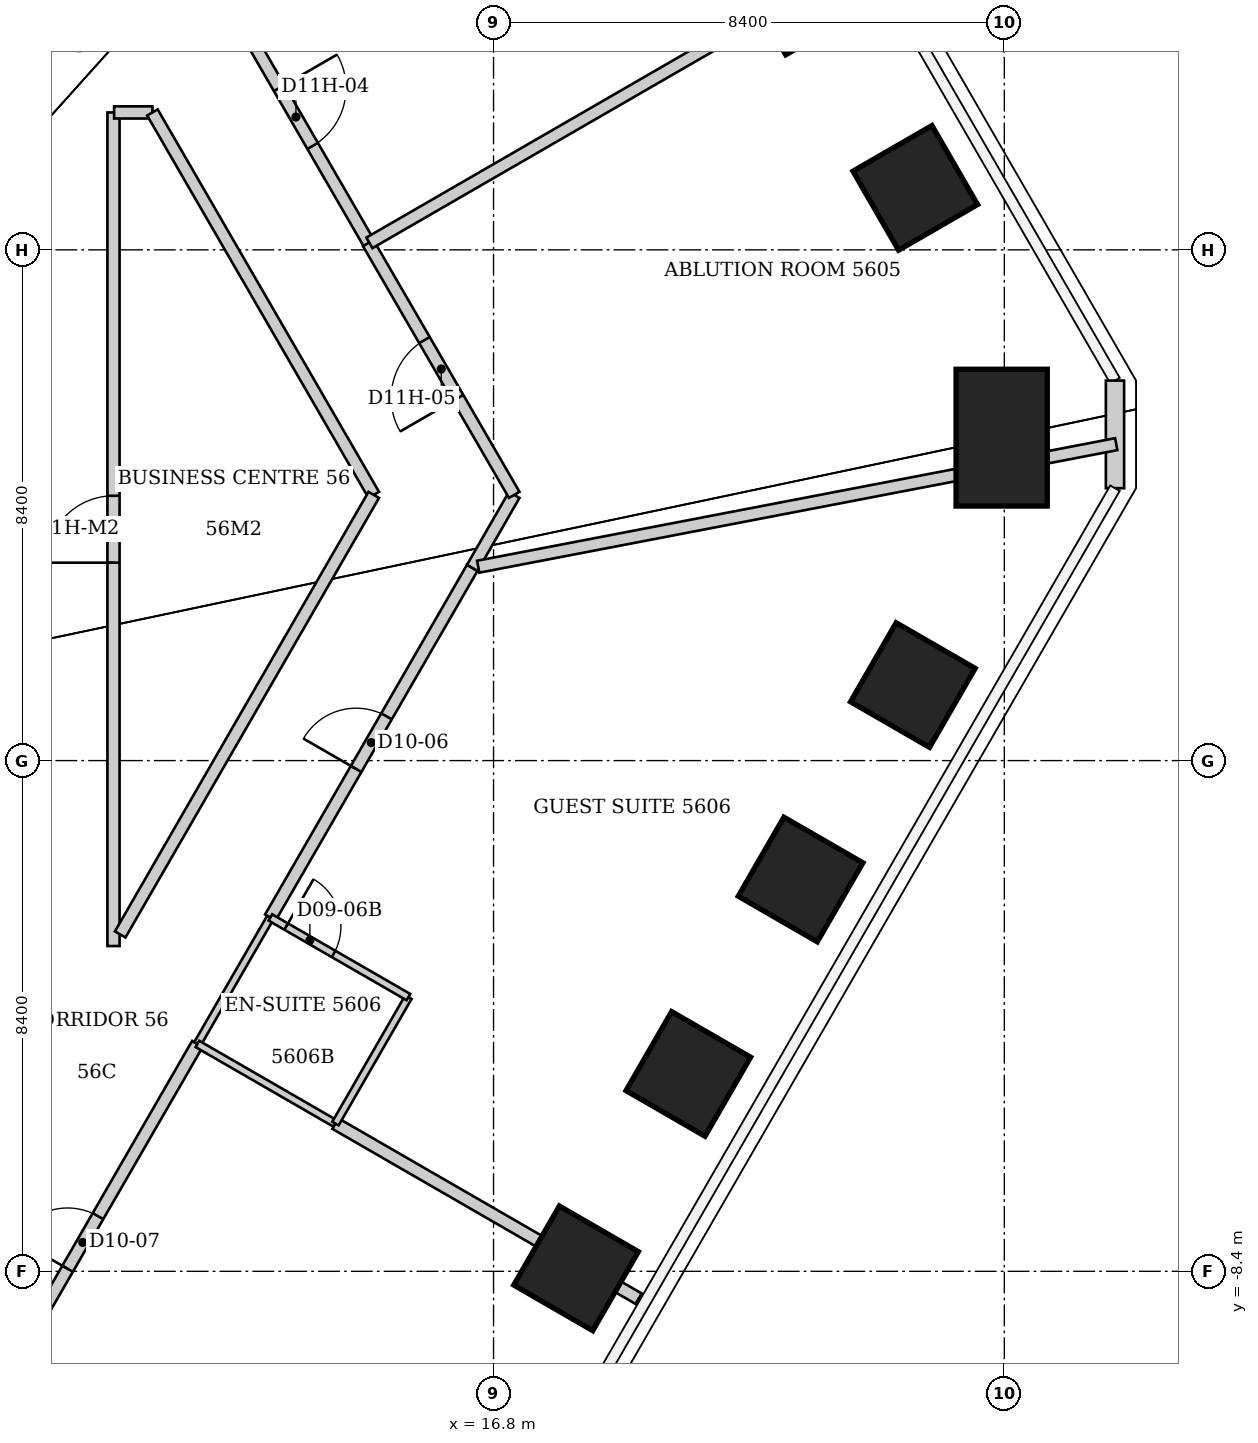
"""IFC4 building model, lengths in metres.
Left out: names, types, materials, properties, quantities, classifications, styles, units other than length and angle.
Written with IfcOpenShell. Run it as: python <this file> out.ifc"""

import sys

from ifc_helpers import new_model, si_unit, direction, frame, frame_2d, origin, origin_2d, place, context, subcontext, project, spatial, rectangle, extrude, element, fill, save


model = new_model("IFC4")
c1 = context("Model", 3, precision=1e-05, world=origin(), true_north=direction((0.0, 1.0)))
c2 = subcontext(c1, "Body", "Model", "MODEL_VIEW")
j1 = project(units=[si_unit("LENGTHUNIT", "METRE"), si_unit("PLANEANGLEUNIT", "RADIAN")], contexts=[c1])
p1 = place(None, origin())
s1 = spatial("IfcSite", under=j1, at=p1, CompositionType="ELEMENT")
p2 = place(p1, origin())
s2 = spatial("IfcBuilding", under=s1, at=p2, CompositionType="ELEMENT")
p3 = place(p2, frame((0.0, 0.0, 225.0)))
s3 = spatial("IfcBuildingStorey", under=s2, at=p3, CompositionType="ELEMENT", Elevation=225.0)
for number, where, z_axis, x_axis in (
    (1, (21.88, 12.633, 0.0), (0.0, 0.0, 1.0), (0.866, 0.5, 0.0)),
    (2, (23.735, 9.419, 0.0), (0.0, 0.0, 1.0), (0.866, 0.5, 0.0)),
):
    element("IfcColumn", number, at=place(p3, frame(where, z_axis=z_axis, x_axis=x_axis)), inside=s3, PredefinedType="COLUMN", context=c2, shape_type="SweptSolid", body=[
        extrude(rectangle(XDim=1.5, YDim=1.5, at=origin_2d()), origin(), (0.0, 0.0, 1.0), 3.8),
    ])
p4 = place(p3, frame((25.156, 5.311, 0.0), z_axis=(0.0, 0.0, 1.0), x_axis=(1.0, 0.0, 0.0)))
e3 = element("IfcColumn", 3, at=p4, inside=s3, PredefinedType="COLUMN", context=c2, shape_type="SweptSolid", body=[
    extrude(rectangle(XDim=1.5, YDim=2.25, at=origin_2d()), origin(), (0.0, 0.0, 1.0), 3.8),
])
for number, where, z_axis, x_axis in (
    (4, (23.696, 1.242, 0.0), (0.0, 0.0, 1.0), (0.866, -0.5, 0.0)),
    (5, (21.85, -1.956, 0.0), (0.0, 0.0, 1.0), (0.866, -0.5, 0.0)),
    (6, (20.003, -5.153, 0.0), (0.0, 0.0, 1.0), (0.866, -0.5, 0.0)),
    (7, (18.157, -8.351, 0.0), (0.0, 0.0, 1.0), (0.866, -0.5, 0.0)),
):
    element("IfcColumn", number, at=place(p3, frame(where, z_axis=z_axis, x_axis=x_axis)), inside=s3, PredefinedType="COLUMN", context=c2, shape_type="SweptSolid", body=[
        extrude(rectangle(XDim=1.5, YDim=1.5, at=origin_2d()), origin(), (0.0, 0.0, 1.0), 3.8),
    ])
p5 = place(p3, frame((27.02, 6.25, 0.0), z_axis=(0.0, 0.0, 1.0), x_axis=(0.0, -1.0, 0.0)))
e8 = element("IfcWall", 8, at=p5, inside=s3, PredefinedType="SOLIDWALL", context=c2, shape_type="SweptSolid", body=[
    extrude(rectangle(XDim=1.77, YDim=0.3, at=frame_2d((0.885, 0.0))), origin(), (0.0, 0.0, 1.0), 3.64),
])
p6 = place(p3, frame((8.16, -11.19, 0.0), z_axis=(0.0, 0.0, 1.0), x_axis=(0.500004606796, 0.866022744033, 0.0)))
e9 = element("IfcWall", 9, at=p6, inside=s3, PredefinedType="PARTITIONING", context=c2, shape_type="SweptSolid", body=[
    extrude(rectangle(XDim=7.54, YDim=0.2, at=frame_2d((3.77, 0.0))), origin(), (0.0, 0.0, 1.0), 3.64),
])
p7 = place(p6, frame((3.27, 0.0, 0.0)))
e10 = element("IfcOpeningElement", 10, at=p7, cuts=e9, PredefinedType="OPENING", context=c2, shape_type="SweptSolid", body=[
    extrude(rectangle(XDim=1.0, YDim=2.13, at=frame_2d((0.5, 1.065))), frame((0.0, 0.1, 0.0), z_axis=(0.0, -1.0, 0.0), x_axis=(1.0, 0.0, 0.0)), (0.0, 0.0, 1.0), 0.2),
])
p8 = place(p3, frame((10.55, -3.05, 0.0), z_axis=(0.0, 0.0, 1.0), x_axis=(0.0, 1.0, 0.0)))
e11 = element("IfcWall", 11, at=p8, inside=s3, PredefinedType="PARTITIONING", context=c2, shape_type="SweptSolid", body=[
    extrude(rectangle(XDim=13.71, YDim=0.2, at=frame_2d((6.855, 0.0))), origin(), (0.0, 0.0, 1.0), 3.64),
])
p9 = place(p8, frame((6.305, 0.0, 0.0)))
e12 = element("IfcOpeningElement", 12, at=p9, cuts=e11, PredefinedType="OPENING", context=c2, shape_type="SweptSolid", body=[
    extrude(rectangle(XDim=1.1, YDim=2.2, at=frame_2d((0.55, 1.1))), frame((0.0, 0.1, 0.0), z_axis=(0.0, -1.0, 0.0), x_axis=(1.0, 0.0, 0.0)), (0.0, 0.0, 1.0), 0.2),
])
p10 = place(p3, frame((10.56, 10.66, 0.0), z_axis=(0.0, 0.0, 1.0), x_axis=(1.0, 0.0, 0.0)))
e13 = element("IfcWall", 13, at=p10, inside=s3, PredefinedType="PARTITIONING", context=c2, shape_type="SweptSolid", body=[
    extrude(rectangle(XDim=0.63, YDim=0.2, at=frame_2d((0.315, 0.0))), origin(), (0.0, 0.0, 1.0), 3.64),
])
p11 = place(p3, frame((11.19, 10.66, 0.0), z_axis=(0.0, 0.0, 1.0), x_axis=(0.500899863475, -0.865505243642, 0.0)))
e14 = element("IfcWall", 14, at=p11, inside=s3, PredefinedType="PARTITIONING", context=c2, shape_type="SweptSolid", body=[
    extrude(rectangle(XDim=7.267, YDim=0.2, at=frame_2d((3.634, 0.0))), origin(), (0.0, 0.0, 1.0), 3.64),
])
p12 = place(p3, frame((11.93, -4.66, 0.0), z_axis=(0.0, 0.0, 1.0), x_axis=(0.499737123639, 0.866177122335, 0.0)))
e15 = element("IfcWall", 15, at=p12, inside=s3, PredefinedType="PARTITIONING", context=c2, shape_type="SweptSolid", body=[
    extrude(rectangle(XDim=2.401, YDim=0.12, at=frame_2d((1.201, 0.0))), origin(), (0.0, 0.0, 1.0), 3.64),
])
p13 = place(p3, frame((11.93, -4.66, 0.0), z_axis=(0.0, 0.0, 1.0), x_axis=(0.865969958829, -0.500096021185, 0.0)))
e16 = element("IfcWall", 16, at=p13, inside=s3, PredefinedType="PARTITIONING", context=c2, shape_type="SweptSolid", body=[
    extrude(rectangle(XDim=2.621, YDim=0.12, at=frame_2d((1.311, 0.0))), origin(), (0.0, 0.0, 1.0), 3.038),
])
p14 = place(p3, frame((12.35, 12.66, 0.0), z_axis=(0.0, 0.0, 1.0), x_axis=(0.500618647881, -0.86566793252, 0.0)))
e17 = element("IfcWall", 17, at=p14, inside=s3, PredefinedType="PARTITIONING", context=c2, shape_type="SweptSolid", body=[
    extrude(rectangle(XDim=4.794, YDim=0.2, at=frame_2d((2.397, 0.0))), origin(), (0.0, 0.0, 1.0), 3.64),
])
p15 = place(p14, frame((1.847, 0.0, 0.0)))
e18 = element("IfcOpeningElement", 18, at=p15, cuts=e17, PredefinedType="OPENING", context=c2, shape_type="SweptSolid", body=[
    extrude(rectangle(XDim=1.1, YDim=2.2, at=frame_2d((0.55, 1.1))), frame((0.0, 0.1, 0.0), z_axis=(0.0, -1.0, 0.0), x_axis=(1.0, 0.0, 0.0)), (0.0, 0.0, 1.0), 0.2),
])
p16 = place(p3, frame((13.13, -2.58, 0.0), z_axis=(0.0, 0.0, 1.0), x_axis=(0.500034373799, 0.866005557153, 0.0)))
e19 = element("IfcWall", 19, at=p16, inside=s3, PredefinedType="PARTITIONING", context=c2, shape_type="SweptSolid", body=[
    extrude(rectangle(XDim=6.64, YDim=0.2, at=frame_2d((3.32, 0.0))), origin(), (0.0, 0.0, 1.0), 3.64),
])
p17 = place(p16, frame((2.82, 0.0, 0.0)))
e20 = element("IfcOpeningElement", 20, at=p17, cuts=e19, PredefinedType="OPENING", context=c2, shape_type="SweptSolid", body=[
    extrude(rectangle(XDim=1.0, YDim=2.13, at=frame_2d((0.5, 1.065))), frame((0.0, 0.1, 0.0), z_axis=(0.0, -1.0, 0.0), x_axis=(1.0, 0.0, 0.0)), (0.0, 0.0, 1.0), 0.2),
])
p18 = place(p3, frame((14.2, -5.971, 0.0), z_axis=(0.0, 0.0, 1.0), x_axis=(0.86600340545, -0.500038100297, 0.0)))
e21 = element("IfcWall", 21, at=p18, inside=s3, PredefinedType="PARTITIONING", context=c2, shape_type="SweptSolid", body=[
    extrude(rectangle(XDim=5.758, YDim=0.2, at=frame_2d((2.879, 0.0))), origin(), (0.0, 0.0, 1.0), 3.038),
])
p19 = place(p3, frame((14.2, -5.97, 0.0), z_axis=(0.0, 0.0, 1.0), x_axis=(0.499737123639, 0.866177122335, 0.0)))
e22 = element("IfcWall", 22, at=p19, inside=s3, PredefinedType="PARTITIONING", context=c2, shape_type="SweptSolid", body=[
    extrude(rectangle(XDim=2.401, YDim=0.12, at=frame_2d((1.201, 0.0))), origin(), (0.0, 0.0, 1.0), 3.64),
])
p20 = place(p3, frame((14.83, 4.37, 0.0), z_axis=(0.0, 0.0, 1.0), x_axis=(-0.499659986498, -0.866221621695, 0.0)))
e23 = element("IfcWall", 23, at=p20, inside=s3, PredefinedType="PARTITIONING", context=c2, shape_type="SweptSolid", body=[
    extrude(rectangle(XDim=8.346, YDim=0.2, at=frame_2d((4.173, 0.0))), origin(), (0.0, 0.0, 1.0), 3.64),
])
p21 = place(p3, frame((15.4, -3.89, 0.0), z_axis=(0.0, 0.0, 1.0), x_axis=(-0.866154567199, 0.49977621564, 0.0)))
e24 = element("IfcWall", 24, at=p21, inside=s3, PredefinedType="PARTITIONING", context=c2, shape_type="SweptSolid", body=[
    extrude(rectangle(XDim=2.621, YDim=0.12, at=frame_2d((1.311, 0.0))), origin(), (0.0, 0.0, 1.0), 3.64),
])
p22 = place(p21, frame((1.421, 0.0, 0.0)))
e25 = element("IfcOpeningElement", 25, at=p22, cuts=e24, PredefinedType="OPENING", context=c2, shape_type="SweptSolid", body=[
    extrude(rectangle(XDim=0.9, YDim=2.03, at=frame_2d((0.45, 1.015))), frame((0.0, 0.06, 0.0), z_axis=(0.0, -1.0, 0.0), x_axis=(1.0, 0.0, 0.0)), (0.0, 0.0, 1.0), 0.12),
])
p23 = place(p3, frame((16.45, 3.17, 0.0), z_axis=(0.0, 0.0, 1.0), x_axis=(0.49845455473, 0.866915830325, 0.0)))
e26 = element("IfcWall", 26, at=p23, inside=s3, PredefinedType="PARTITIONING", context=c2, shape_type="SweptSolid", body=[
    extrude(rectangle(XDim=1.384, YDim=0.2, at=frame_2d((0.692, 0.0))), origin(), (0.0, 0.0, 1.0), 3.64),
])
p24 = place(p3, frame((17.14, 4.37, 0.0), z_axis=(0.0, 0.0, 1.0), x_axis=(-0.501524901322, 0.865143209737, 0.0)))
e27 = element("IfcWall", 27, at=p24, inside=s3, PredefinedType="PARTITIONING", context=c2, shape_type="SweptSolid", body=[
    extrude(rectangle(XDim=4.785, YDim=0.2, at=frame_2d((2.393, 0.0))), origin(), (0.0, 0.0, 1.0), 3.64),
])
p25 = place(p24, frame((1.843, 0.0, 0.0)))
e28 = element("IfcOpeningElement", 28, at=p25, cuts=e27, PredefinedType="OPENING", context=c2, shape_type="SweptSolid", body=[
    extrude(rectangle(XDim=1.1, YDim=2.2, at=frame_2d((0.55, 1.1))), frame((0.0, 0.1, 0.0), z_axis=(0.0, -1.0, 0.0), x_axis=(1.0, 0.0, 0.0)), (0.0, 0.0, 1.0), 0.2),
])
p26 = place(p3, frame((22.866, 13.2, 0.0), z_axis=(0.0, 0.0, 1.0), x_axis=(-0.865840726882, -0.500319733442, 0.0)))
e29 = element("IfcWall", 29, at=p26, inside=s3, PredefinedType="PARTITIONING", context=c2, shape_type="SweptSolid", body=[
    extrude(rectangle(XDim=9.364, YDim=0.2, at=frame_2d((4.682, 0.0))), origin(), (0.0, 0.0, 1.0), 2.878),
])
p27 = place(p3, frame((27.041, 5.204, 0.0), z_axis=(0.0, 0.0, 1.0), x_axis=(-0.982047984466, -0.188631270488, 0.0)))
e30 = element("IfcWall", 30, at=p27, inside=s3, PredefinedType="PARTITIONING", context=c2, shape_type="SweptSolid", body=[
    extrude(rectangle(XDim=10.684, YDim=0.2, at=frame_2d((5.342, 0.0))), origin(), (0.0, 0.0, 1.0), 3.64),
])
p28 = place(p15, origin())
e31 = element("IfcDoor", 31, at=p28, inside=s3, OperationType="SINGLE_SWING_LEFT", PredefinedType="DOOR", context=c2, shape_type="SweptSolid", body=[
    extrude(rectangle(XDim=1.1, YDim=2.2, at=frame_2d((0.55, 1.1))), frame((0.0, 0.025, 0.0), z_axis=(0.0, -1.0, 0.0), x_axis=(1.0, 0.0, 0.0)), (0.0, 0.0, 1.0), 0.05),
])
fill(e18, e31)
p29 = place(p25, origin())
e32 = element("IfcDoor", 32, at=p29, inside=s3, OperationType="SINGLE_SWING_LEFT", PredefinedType="DOOR", context=c2, shape_type="SweptSolid", body=[
    extrude(rectangle(XDim=1.1, YDim=2.2, at=frame_2d((0.55, 1.1))), frame((0.0, 0.025, 0.0), z_axis=(0.0, -1.0, 0.0), x_axis=(1.0, 0.0, 0.0)), (0.0, 0.0, 1.0), 0.05),
])
fill(e28, e32)
p30 = place(p17, origin())
e33 = element("IfcDoor", 33, at=p30, inside=s3, OperationType="SINGLE_SWING_LEFT", PredefinedType="DOOR", context=c2, shape_type="SweptSolid", body=[
    extrude(rectangle(XDim=1.0, YDim=2.13, at=frame_2d((0.5, 1.065))), frame((0.0, 0.025, 0.0), z_axis=(0.0, -1.0, 0.0), x_axis=(1.0, 0.0, 0.0)), (0.0, 0.0, 1.0), 0.05),
])
fill(e20, e33)
p31 = place(p22, origin())
e34 = element("IfcDoor", 34, at=p31, inside=s3, OperationType="SINGLE_SWING_RIGHT", PredefinedType="DOOR", context=c2, shape_type="SweptSolid", body=[
    extrude(rectangle(XDim=0.9, YDim=2.03, at=frame_2d((0.45, 1.015))), frame((0.0, 0.025, 0.0), z_axis=(0.0, -1.0, 0.0), x_axis=(1.0, 0.0, 0.0)), (0.0, 0.0, 1.0), 0.05),
])
fill(e25, e34)
p32 = place(p7, origin())
e35 = element("IfcDoor", 35, at=p32, inside=s3, OperationType="SINGLE_SWING_LEFT", PredefinedType="DOOR", context=c2, shape_type="SweptSolid", body=[
    extrude(rectangle(XDim=1.0, YDim=2.13, at=frame_2d((0.5, 1.065))), frame((0.0, 0.025, 0.0), z_axis=(0.0, -1.0, 0.0), x_axis=(1.0, 0.0, 0.0)), (0.0, 0.0, 1.0), 0.05),
])
fill(e10, e35)
p33 = place(p9, origin())
e36 = element("IfcDoor", 36, at=p33, inside=s3, OperationType="SINGLE_SWING_LEFT", PredefinedType="DOOR", context=c2, shape_type="SweptSolid", body=[
    extrude(rectangle(XDim=1.1, YDim=2.2, at=frame_2d((0.55, 1.1))), frame((0.0, 0.025, 0.0), z_axis=(0.0, -1.0, 0.0), x_axis=(1.0, 0.0, 0.0)), (0.0, 0.0, 1.0), 0.05),
])
fill(e12, e36)
save(model, sys.argv[1])
